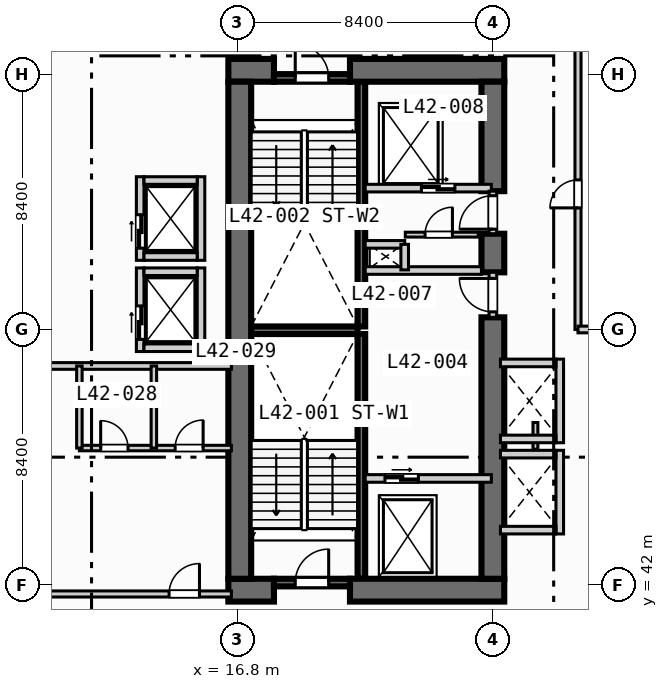
"""IFC4 building model, lengths in metres.
Left out: names, types, materials, properties, quantities, classifications, styles, units other than length and angle.
Written with IfcOpenShell. Run it as: python <this file> out.ifc"""

import sys

from ifc_helpers import new_model, si_unit, direction, frame, frame_2d, origin, place, context, subcontext, project, spatial, rectangle, extrude, element, fill, save


model = new_model("IFC4")
c1 = context("Model", 3, precision=1e-05, world=origin(), true_north=direction((0.0, 1.0)))
c2 = subcontext(c1, "Body", "Model", "MODEL_VIEW")
j1 = project(units=[si_unit("LENGTHUNIT", "METRE"), si_unit("PLANEANGLEUNIT", "RADIAN")], contexts=[c1])
p1 = place(None, origin())
s1 = spatial("IfcSite", under=j1, at=p1, CompositionType="ELEMENT")
p2 = place(p1, origin())
s2 = spatial("IfcBuilding", under=s1, at=p2, CompositionType="ELEMENT")
p3 = place(p2, frame((0.0, 0.0, 175.4)))
s3 = spatial("IfcBuildingStorey", under=s2, at=p3, CompositionType="ELEMENT", Elevation=175.4)
for number, where, z_axis, x_axis in (
    (1, (20.875, 42.2, 0.0), (0.0, 0.0, 1.0), (0.0, 1.0, 0.0)),
    (2, (20.875, 50.5, 0.0), (0.0, 0.0, 1.0), (0.0, 1.0, 0.0)),
):
    element("IfcWall", number, at=place(p3, frame(where, z_axis=z_axis, x_axis=x_axis)), inside=s3, PredefinedType="SOLIDWALL", context=c2, shape_type="SweptSolid", body=[
        extrude(rectangle(XDim=8.05, YDim=0.25, at=frame_2d((4.025, 0.0))), origin(), (0.0, 0.0, 1.0), 3.47),
    ])
p4 = place(p3, frame((17.25, 50.375, 0.0), z_axis=(0.0, 0.0, 1.0), x_axis=(1.0, 0.0, 0.0)))
e3 = element("IfcWall", 3, at=p4, inside=s3, PredefinedType="SOLIDWALL", context=c2, shape_type="SweptSolid", body=[
    extrude(rectangle(XDim=3.5, YDim=0.25, at=frame_2d((1.75, 0.0))), origin(), (0.0, 0.0, 1.0), 3.47),
])
p5 = place(p3, frame((16.5, 41.825, 0.0), z_axis=(0.0, 0.0, 1.0), x_axis=(1.0, 0.0, 0.0)))
e4 = element("IfcWall", 4, at=p5, inside=s3, PredefinedType="SHEAR", context=c2, shape_type="SweptSolid", body=[
    extrude(rectangle(XDim=1.5, YDim=0.75, at=frame_2d((0.75, 0.0))), origin(), (0.0, 0.0, 1.0), 3.47),
])
p6 = place(p3, frame((20.5, 41.825, 0.0), z_axis=(0.0, 0.0, 1.0), x_axis=(1.0, 0.0, 0.0)))
e5 = element("IfcWall", 5, at=p6, inside=s3, PredefinedType="SHEAR", context=c2, shape_type="SweptSolid", body=[
    extrude(rectangle(XDim=5.075, YDim=0.75, at=frame_2d((2.538, 0.0))), origin(), (0.0, 0.0, 1.0), 3.47),
])
p7 = place(p3, frame((16.5, 58.925, 0.0), z_axis=(0.0, 0.0, 1.0), x_axis=(1.0, 0.0, 0.0)))
e6 = element("IfcWall", 6, at=p7, inside=s3, PredefinedType="SHEAR", context=c2, shape_type="SweptSolid", body=[
    extrude(rectangle(XDim=1.5, YDim=0.75, at=frame_2d((0.75, 0.0))), origin(), (0.0, 0.0, 1.0), 3.47),
])
p8 = place(p3, frame((20.5, 58.925, 0.0), z_axis=(0.0, 0.0, 1.0), x_axis=(1.0, 0.0, 0.0)))
e7 = element("IfcWall", 7, at=p8, inside=s3, PredefinedType="SHEAR", context=c2, shape_type="SweptSolid", body=[
    extrude(rectangle(XDim=5.075, YDim=0.75, at=frame_2d((2.538, 0.0))), origin(), (0.0, 0.0, 1.0), 3.47),
])
p9 = place(p3, frame((16.875, 42.2, 0.0), z_axis=(0.0, 0.0, 1.0), x_axis=(0.0, 1.0, 0.0)))
e8 = element("IfcWall", 8, at=p9, inside=s3, PredefinedType="SHEAR", context=c2, shape_type="SweptSolid", body=[
    extrude(rectangle(XDim=16.35, YDim=0.75, at=frame_2d((8.175, 0.0))), origin(), (0.0, 0.0, 1.0), 3.47),
])
p10 = place(p3, frame((25.2, 42.2, 0.0), z_axis=(0.0, 0.0, 1.0), x_axis=(0.0, 1.0, 0.0)))
e9 = element("IfcWall", 9, at=p10, inside=s3, PredefinedType="SHEAR", context=c2, shape_type="SweptSolid", body=[
    extrude(rectangle(XDim=8.6, YDim=0.75, at=frame_2d((4.3, 0.0))), origin(), (0.0, 0.0, 1.0), 3.47),
])
p11 = place(p3, frame((25.2, 52.28, 0.0), z_axis=(0.0, 0.0, 1.0), x_axis=(0.0, 1.0, 0.0)))
e10 = element("IfcWall", 10, at=p11, inside=s3, PredefinedType="SHEAR", context=c2, shape_type="SweptSolid", body=[
    extrude(rectangle(XDim=1.27, YDim=0.75, at=frame_2d((0.635, 0.0))), origin(), (0.0, 0.0, 1.0), 3.47),
])
p12 = place(p3, frame((25.2, 54.95, 0.0), z_axis=(0.0, 0.0, 1.0), x_axis=(0.0, 1.0, 0.0)))
e11 = element("IfcWall", 11, at=p12, inside=s3, PredefinedType="SHEAR", context=c2, shape_type="SweptSolid", body=[
    extrude(rectangle(XDim=3.6, YDim=0.75, at=frame_2d((1.8, 0.0))), origin(), (0.0, 0.0, 1.0), 3.47),
])
p13 = place(p3, frame((18.0, 42.075, 0.0), z_axis=(0.0, 0.0, 1.0), x_axis=(1.0, 0.0, 0.0)))
e12 = element("IfcWall", 12, at=p13, inside=s3, PredefinedType="SOLIDWALL", context=c2, shape_type="SweptSolid", body=[
    extrude(rectangle(XDim=2.5, YDim=0.25, at=frame_2d((1.25, 0.0))), origin(), (0.0, 0.0, 1.0), 3.47),
])
p14 = place(p13, frame((0.7, 0.0, 0.0)))
e13 = element("IfcOpeningElement", 13, at=p14, cuts=e12, PredefinedType="OPENING", context=c2, shape_type="SweptSolid", body=[
    extrude(rectangle(XDim=1.1, YDim=2.15, at=frame_2d((0.55, 1.075))), frame((0.0, 0.135, 0.0), z_axis=(0.0, -1.0, 0.0), x_axis=(1.0, 0.0, 0.0)), (0.0, 0.0, 1.0), 0.27),
])
p15 = place(p3, frame((18.0, 58.675, 0.0), z_axis=(0.0, 0.0, 1.0), x_axis=(1.0, 0.0, 0.0)))
e14 = element("IfcWall", 14, at=p15, inside=s3, PredefinedType="SOLIDWALL", context=c2, shape_type="SweptSolid", body=[
    extrude(rectangle(XDim=2.5, YDim=0.25, at=frame_2d((1.25, 0.0))), origin(), (0.0, 0.0, 1.0), 3.47),
])
p16 = place(p15, frame((0.7, 0.0, 0.0)))
e15 = element("IfcOpeningElement", 15, at=p16, cuts=e14, PredefinedType="OPENING", context=c2, shape_type="SweptSolid", body=[
    extrude(rectangle(XDim=1.1, YDim=2.15, at=frame_2d((0.55, 1.075))), frame((0.0, 0.135, 0.0), z_axis=(0.0, -1.0, 0.0), x_axis=(1.0, 0.0, 0.0)), (0.0, 0.0, 1.0), 0.27),
])
p17 = place(p3, frame((21.0, 45.5, 0.0), z_axis=(0.0, 0.0, 1.0), x_axis=(1.0, 0.0, 0.0)))
e16 = element("IfcWall", 16, at=p17, inside=s3, PredefinedType="SOLIDWALL", context=c2, shape_type="SweptSolid", body=[
    extrude(rectangle(XDim=4.15, YDim=0.25, at=frame_2d((2.075, 0.0))), origin(), (0.0, 0.0, 1.0), 3.47),
])
p18 = place(p17, frame((0.65, 0.0, 0.0)))
e17 = element("IfcOpeningElement", 17, at=p18, cuts=e16, PredefinedType="OPENING", context=c2, shape_type="SweptSolid", body=[
    extrude(rectangle(XDim=1.1, YDim=2.15, at=frame_2d((0.55, 1.075))), frame((0.0, 0.135, 0.0), z_axis=(0.0, -1.0, 0.0), x_axis=(1.0, 0.0, 0.0)), (0.0, 0.0, 1.0), 0.27),
])
p19 = place(p3, frame((25.2, 50.8, 0.0), z_axis=(0.0, 0.0, 1.0), x_axis=(0.0, 1.0, 0.0)))
e18 = element("IfcWall", 18, at=p19, inside=s3, PredefinedType="SOLIDWALL", context=c2, shape_type="SweptSolid", body=[
    extrude(rectangle(XDim=1.48, YDim=0.25, at=frame_2d((0.74, 0.0))), origin(), (0.0, 0.0, 1.0), 3.47),
])
p20 = place(p19, frame((0.18, 0.0, 0.0)))
e19 = element("IfcOpeningElement", 19, at=p20, cuts=e18, PredefinedType="OPENING", context=c2, shape_type="SweptSolid", body=[
    extrude(rectangle(XDim=1.1, YDim=2.15, at=frame_2d((0.55, 1.075))), frame((0.0, 0.135, 0.0), z_axis=(0.0, -1.0, 0.0), x_axis=(1.0, 0.0, 0.0)), (0.0, 0.0, 1.0), 0.27),
])
p21 = place(p3, frame((21.0, 52.34, 0.0), z_axis=(0.0, 0.0, 1.0), x_axis=(1.0, 0.0, 0.0)))
e20 = element("IfcWall", 20, at=p21, inside=s3, PredefinedType="SOLIDWALL", context=c2, shape_type="SweptSolid", body=[
    extrude(rectangle(XDim=3.825, YDim=0.25, at=frame_2d((1.913, 0.0))), origin(), (0.0, 0.0, 1.0), 3.47),
])
p22 = place(p3, frame((21.0, 55.05, 0.0), z_axis=(0.0, 0.0, 1.0), x_axis=(1.0, 0.0, 0.0)))
e21 = element("IfcWall", 21, at=p22, inside=s3, PredefinedType="SOLIDWALL", context=c2, shape_type="SweptSolid", body=[
    extrude(rectangle(XDim=4.15, YDim=0.25, at=frame_2d((2.075, 0.0))), origin(), (0.0, 0.0, 1.0), 3.47),
])
p23 = place(p22, frame((1.85, 0.0, 0.0)))
e22 = element("IfcOpeningElement", 22, at=p23, cuts=e21, PredefinedType="OPENING", context=c2, shape_type="SweptSolid", body=[
    extrude(rectangle(XDim=1.1, YDim=2.15, at=frame_2d((0.55, 1.075))), frame((0.0, 0.135, 0.0), z_axis=(0.0, -1.0, 0.0), x_axis=(1.0, 0.0, 0.0)), (0.0, 0.0, 1.0), 0.27),
])
p24 = place(p3, frame((25.2, 53.55, 0.0), z_axis=(0.0, 0.0, 1.0), x_axis=(0.0, 1.0, 0.0)))
e23 = element("IfcWall", 23, at=p24, inside=s3, PredefinedType="SOLIDWALL", context=c2, shape_type="SweptSolid", body=[
    extrude(rectangle(XDim=1.4, YDim=0.25, at=frame_2d((0.7, 0.0))), origin(), (0.0, 0.0, 1.0), 3.47),
])
p25 = place(p24, frame((0.15, 0.0, 0.0)))
e24 = element("IfcOpeningElement", 24, at=p25, cuts=e23, PredefinedType="OPENING", context=c2, shape_type="SweptSolid", body=[
    extrude(rectangle(XDim=1.1, YDim=2.15, at=frame_2d((0.55, 1.075))), frame((0.0, 0.135, 0.0), z_axis=(0.0, -1.0, 0.0), x_axis=(1.0, 0.0, 0.0)), (0.0, 0.0, 1.0), 0.27),
])
p26 = place(p3, frame((21.0, 53.2, 0.0), z_axis=(0.0, 0.0, 1.0), x_axis=(1.0, 0.0, 0.0)))
e25 = element("IfcWall", 25, at=p26, inside=s3, PredefinedType="SOLIDWALL", context=c2, shape_type="SweptSolid", body=[
    extrude(rectangle(XDim=1.3, YDim=0.25, at=frame_2d((0.65, 0.0))), origin(), (0.0, 0.0, 1.0), 3.47),
])
p27 = place(p3, frame((22.3, 52.36, 0.0), z_axis=(0.0, 0.0, 1.0), x_axis=(0.0, 1.0, 0.0)))
e26 = element("IfcWall", 26, at=p27, inside=s3, PredefinedType="SOLIDWALL", context=c2, shape_type="SweptSolid", body=[
    extrude(rectangle(XDim=0.84, YDim=0.25, at=frame_2d((0.42, 0.0))), origin(), (0.0, 0.0, 1.0), 3.47),
])
p28 = place(p3, frame((22.32, 53.52, 0.0), z_axis=(0.0, 0.0, 1.0), x_axis=(1.0, 0.0, 0.0)))
e27 = element("IfcWall", 27, at=p28, inside=s3, PredefinedType="PARTITIONING", context=c2, shape_type="SweptSolid", body=[
    extrude(rectangle(XDim=2.4, YDim=0.16, at=frame_2d((1.2, 0.0))), origin(), (0.0, 0.0, 1.0), 3.47),
])
p29 = place(p28, frame((0.65, 0.0, 0.0)))
e28 = element("IfcOpeningElement", 28, at=p29, cuts=e27, PredefinedType="OPENING", context=c2, shape_type="SweptSolid", body=[
    extrude(rectangle(XDim=0.9, YDim=2.1, at=frame_2d((0.45, 1.05))), frame((0.0, 0.09, 0.0), z_axis=(0.0, -1.0, 0.0), x_axis=(1.0, 0.0, 0.0)), (0.0, 0.0, 1.0), 0.18),
])
p30 = place(p3, frame((13.6, 49.675, 0.0), z_axis=(0.0, 0.0, 1.0), x_axis=(0.0, 1.0, 0.0)))
e29 = element("IfcWall", 29, at=p30, inside=s3, PredefinedType="SOLIDWALL", context=c2, shape_type="SweptSolid", body=[
    extrude(rectangle(XDim=2.75, YDim=0.25, at=frame_2d((1.375, 0.0))), origin(), (0.0, 0.0, 1.0), 3.47),
])
p31 = place(p30, frame((0.4, 0.0, 0.0)))
e30 = element("IfcOpeningElement", 30, at=p31, cuts=e29, PredefinedType="OPENING", context=c2, shape_type="SweptSolid", body=[
    extrude(rectangle(XDim=1.1, YDim=2.15, at=frame_2d((0.55, 1.075))), frame((0.0, 0.135, 0.0), z_axis=(0.0, -1.0, 0.0), x_axis=(1.0, 0.0, 0.0)), (0.0, 0.0, 1.0), 0.27),
])
p32 = place(p3, frame((15.6, 49.675, 0.0), z_axis=(0.0, 0.0, 1.0), x_axis=(0.0, 1.0, 0.0)))
e31 = element("IfcWall", 31, at=p32, inside=s3, PredefinedType="SOLIDWALL", context=c2, shape_type="SweptSolid", body=[
    extrude(rectangle(XDim=2.75, YDim=0.25, at=frame_2d((1.375, 0.0))), origin(), (0.0, 0.0, 1.0), 3.47),
])
for number, where, z_axis, x_axis in (
    (32, (13.725, 49.8, 0.0), (0.0, 0.0, 1.0), (1.0, 0.0, 0.0)),
    (33, (13.725, 52.3, 0.0), (0.0, 0.0, 1.0), (1.0, 0.0, 0.0)),
):
    element("IfcWall", number, at=place(p3, frame(where, z_axis=z_axis, x_axis=x_axis)), inside=s3, PredefinedType="SOLIDWALL", context=c2, shape_type="SweptSolid", body=[
        extrude(rectangle(XDim=1.75, YDim=0.25, at=frame_2d((0.875, 0.0))), origin(), (0.0, 0.0, 1.0), 3.47),
    ])
p33 = place(p3, frame((13.6, 52.675, 0.0), z_axis=(0.0, 0.0, 1.0), x_axis=(0.0, 1.0, 0.0)))
e34 = element("IfcWall", 34, at=p33, inside=s3, PredefinedType="SOLIDWALL", context=c2, shape_type="SweptSolid", body=[
    extrude(rectangle(XDim=2.75, YDim=0.25, at=frame_2d((1.375, 0.0))), origin(), (0.0, 0.0, 1.0), 3.47),
])
p34 = place(p33, frame((0.4, 0.0, 0.0)))
e35 = element("IfcOpeningElement", 35, at=p34, cuts=e34, PredefinedType="OPENING", context=c2, shape_type="SweptSolid", body=[
    extrude(rectangle(XDim=1.1, YDim=2.15, at=frame_2d((0.55, 1.075))), frame((0.0, 0.135, 0.0), z_axis=(0.0, -1.0, 0.0), x_axis=(1.0, 0.0, 0.0)), (0.0, 0.0, 1.0), 0.27),
])
p35 = place(p3, frame((15.6, 52.675, 0.0), z_axis=(0.0, 0.0, 1.0), x_axis=(0.0, 1.0, 0.0)))
e36 = element("IfcWall", 36, at=p35, inside=s3, PredefinedType="SOLIDWALL", context=c2, shape_type="SweptSolid", body=[
    extrude(rectangle(XDim=2.75, YDim=0.25, at=frame_2d((1.375, 0.0))), origin(), (0.0, 0.0, 1.0), 3.47),
])
for number, where, z_axis, x_axis in (
    (37, (13.725, 52.8, 0.0), (0.0, 0.0, 1.0), (1.0, 0.0, 0.0)),
    (38, (13.725, 55.3, 0.0), (0.0, 0.0, 1.0), (1.0, 0.0, 0.0)),
):
    element("IfcWall", number, at=place(p3, frame(where, z_axis=z_axis, x_axis=x_axis)), inside=s3, PredefinedType="SOLIDWALL", context=c2, shape_type="SweptSolid", body=[
        extrude(rectangle(XDim=1.75, YDim=0.25, at=frame_2d((0.875, 0.0))), origin(), (0.0, 0.0, 1.0), 3.47),
    ])
p36 = place(p3, frame((27.4, 43.675, 0.0), z_axis=(0.0, 0.0, 1.0), x_axis=(0.0, 1.0, 0.0)))
e39 = element("IfcWall", 39, at=p36, inside=s3, PredefinedType="SOLIDWALL", context=c2, shape_type="SweptSolid", body=[
    extrude(rectangle(XDim=2.75, YDim=0.25, at=frame_2d((1.375, 0.0))), origin(), (0.0, 0.0, 1.0), 3.47),
])
for number, where, z_axis, x_axis in (
    (40, (25.45, 43.8, 0.0), (0.0, 0.0, 1.0), (1.0, 0.0, 0.0)),
    (41, (25.45, 46.3, 0.0), (0.0, 0.0, 1.0), (1.0, 0.0, 0.0)),
):
    element("IfcWall", number, at=place(p3, frame(where, z_axis=z_axis, x_axis=x_axis)), inside=s3, PredefinedType="SOLIDWALL", context=c2, shape_type="SweptSolid", body=[
        extrude(rectangle(XDim=1.825, YDim=0.25, at=frame_2d((0.913, 0.0))), origin(), (0.0, 0.0, 1.0), 3.47),
    ])
p37 = place(p3, frame((26.6, 46.46, 0.0), z_axis=(0.0, 0.0, 1.0), x_axis=(0.0, 1.0, 0.0)))
e42 = element("IfcWall", 42, at=p37, inside=s3, PredefinedType="PARTITIONING", context=c2, shape_type="SweptSolid", body=[
    extrude(rectangle(XDim=0.88, YDim=0.16, at=frame_2d((0.44, 0.0))), origin(), (0.0, 0.0, 1.0), 3.47),
])
p38 = place(p3, frame((27.4, 46.675, 0.0), z_axis=(0.0, 0.0, 1.0), x_axis=(0.0, 1.0, 0.0)))
e43 = element("IfcWall", 43, at=p38, inside=s3, PredefinedType="SOLIDWALL", context=c2, shape_type="SweptSolid", body=[
    extrude(rectangle(XDim=2.75, YDim=0.25, at=frame_2d((1.375, 0.0))), origin(), (0.0, 0.0, 1.0), 3.47),
])
for number, where, z_axis, x_axis in (
    (44, (25.45, 46.8, 0.0), (0.0, 0.0, 1.0), (1.0, 0.0, 0.0)),
    (45, (25.45, 49.3, 0.0), (0.0, 0.0, 1.0), (1.0, 0.0, 0.0)),
):
    element("IfcWall", number, at=place(p3, frame(where, z_axis=z_axis, x_axis=x_axis)), inside=s3, PredefinedType="SOLIDWALL", context=c2, shape_type="SweptSolid", body=[
        extrude(rectangle(XDim=1.825, YDim=0.25, at=frame_2d((0.913, 0.0))), origin(), (0.0, 0.0, 1.0), 3.47),
    ])
p39 = place(p3, frame((0.35, 41.7, 0.0), z_axis=(0.0, 0.0, 1.0), x_axis=(1.0, 0.0, 0.0)))
e46 = element("IfcWall", 46, at=p39, inside=s3, PredefinedType="PARTITIONING", context=c2, shape_type="SweptSolid", body=[
    extrude(rectangle(XDim=16.25, YDim=0.2, at=frame_2d((8.125, 0.0))), origin(), (0.0, 0.0, 1.0), 2.82),
])
p40 = place(p39, frame((14.2, 0.0, 0.0)))
e47 = element("IfcOpeningElement", 47, at=p40, cuts=e46, PredefinedType="OPENING", context=c2, shape_type="SweptSolid", body=[
    extrude(rectangle(XDim=1.0, YDim=2.15, at=frame_2d((0.5, 1.075))), frame((0.0, 0.11, 0.0), z_axis=(0.0, -1.0, 0.0), x_axis=(1.0, 0.0, 0.0)), (0.0, 0.0, 1.0), 0.22),
])
p41 = place(p3, frame((0.35, 49.2, 0.0), z_axis=(0.0, 0.0, 1.0), x_axis=(1.0, 0.0, 0.0)))
e48 = element("IfcWall", 48, at=p41, inside=s3, PredefinedType="PARTITIONING", context=c2, shape_type="SweptSolid", body=[
    extrude(rectangle(XDim=16.25, YDim=0.22, at=frame_2d((8.125, 0.0))), origin(), (0.0, 0.0, 1.0), 3.47),
])
p42 = place(p3, frame((11.6, 46.5, 0.0), z_axis=(0.0, 0.0, 1.0), x_axis=(1.0, 0.0, 0.0)))
e49 = element("IfcWall", 49, at=p42, inside=s3, PredefinedType="PLUMBINGWALL", context=c2, shape_type="SweptSolid", body=[
    extrude(rectangle(XDim=5.0, YDim=0.18, at=frame_2d((2.5, 0.0))), origin(), (0.0, 0.0, 1.0), 3.47),
])
p43 = place(p42, frame((0.7, 0.0, 0.0)))
e50 = element("IfcOpeningElement", 50, at=p43, cuts=e49, PredefinedType="OPENING", context=c2, shape_type="SweptSolid", body=[
    extrude(rectangle(XDim=0.9, YDim=2.1, at=frame_2d((0.45, 1.05))), frame((0.0, 0.1, 0.0), z_axis=(0.0, -1.0, 0.0), x_axis=(1.0, 0.0, 0.0)), (0.0, 0.0, 1.0), 0.2),
])
p44 = place(p42, frame((3.15, 0.0, 0.0)))
e51 = element("IfcOpeningElement", 51, at=p44, cuts=e49, PredefinedType="OPENING", context=c2, shape_type="SweptSolid", body=[
    extrude(rectangle(XDim=0.92, YDim=2.1, at=frame_2d((0.46, 1.05))), frame((0.0, 0.1, 0.0), z_axis=(0.0, -1.0, 0.0), x_axis=(1.0, 0.0, 0.0)), (0.0, 0.0, 1.0), 0.2),
])
for number, where, z_axis, x_axis in (
    (52, (11.6, 46.5, 0.0), (0.0, 0.0, 1.0), (0.0, 1.0, 0.0)),
    (53, (14.05, 46.5, 0.0), (0.0, 0.0, 1.0), (0.0, 1.0, 0.0)),
):
    element("IfcWall", number, at=place(p3, frame(where, z_axis=z_axis, x_axis=x_axis)), inside=s3, PredefinedType="PLUMBINGWALL", context=c2, shape_type="SweptSolid", body=[
        extrude(rectangle(XDim=2.7, YDim=0.18, at=frame_2d((1.35, 0.0))), origin(), (0.0, 0.0, 1.0), 3.47),
    ])
p45 = place(p3, frame((28.0, 50.4, 0.0), z_axis=(0.0, 0.0, 1.0), x_axis=(0.0, 1.0, 0.0)))
e54 = element("IfcWall", 54, at=p45, inside=s3, PredefinedType="PARTITIONING", context=c2, shape_type="SweptSolid", body=[
    extrude(rectangle(XDim=21.8, YDim=0.2, at=frame_2d((10.9, 0.0))), origin(), (0.0, 0.0, 1.0), 3.47),
])
p46 = place(p45, frame((4.0, 0.0, 0.0)))
e55 = element("IfcOpeningElement", 55, at=p46, cuts=e54, PredefinedType="OPENING", context=c2, shape_type="SweptSolid", body=[
    extrude(rectangle(XDim=0.92, YDim=2.1, at=frame_2d((0.46, 1.05))), frame((0.0, 0.11, 0.0), z_axis=(0.0, -1.0, 0.0), x_axis=(1.0, 0.0, 0.0)), (0.0, 0.0, 1.0), 0.22),
])
p47 = place(p3, frame((28.0, 50.4, 0.0), z_axis=(0.0, 0.0, 1.0), x_axis=(1.0, 0.0, 0.0)))
e56 = element("IfcWall", 56, at=p47, inside=s3, PredefinedType="PARTITIONING", context=c2, shape_type="SweptSolid", body=[
    extrude(rectangle(XDim=5.3, YDim=0.22, at=frame_2d((2.65, 0.0))), origin(), (0.0, 0.0, 1.0), 3.007),
])
p48 = place(p14, origin())
e57 = element("IfcDoor", 57, at=p48, inside=s3, OperationType="SINGLE_SWING_RIGHT", PredefinedType="DOOR", context=c2, shape_type="SweptSolid", body=[
    extrude(rectangle(XDim=1.1, YDim=2.15, at=frame_2d((0.55, 1.075))), frame((0.0, 0.025, 0.0), z_axis=(0.0, -1.0, 0.0), x_axis=(1.0, 0.0, 0.0)), (0.0, 0.0, 1.0), 0.05),
])
fill(e13, e57)
p49 = place(p16, origin())
e58 = element("IfcDoor", 58, at=p49, inside=s3, OperationType="SINGLE_SWING_LEFT", PredefinedType="DOOR", context=c2, shape_type="SweptSolid", body=[
    extrude(rectangle(XDim=1.1, YDim=2.15, at=frame_2d((0.55, 1.075))), frame((0.0, 0.025, 0.0), z_axis=(0.0, -1.0, 0.0), x_axis=(1.0, 0.0, 0.0)), (0.0, 0.0, 1.0), 0.05),
])
fill(e15, e58)
p50 = place(p18, origin())
e59 = element("IfcDoor", 59, at=p50, inside=s3, OperationType="SLIDING_TO_LEFT", PredefinedType="DOOR", context=c2, shape_type="SweptSolid", body=[
    extrude(rectangle(XDim=1.1, YDim=2.15, at=frame_2d((0.55, 1.075))), frame((0.0, 0.025, 0.0), z_axis=(0.0, -1.0, 0.0), x_axis=(1.0, 0.0, 0.0)), (0.0, 0.0, 1.0), 0.05),
])
fill(e17, e59)
p51 = place(p20, origin())
e60 = element("IfcDoor", 60, at=p51, inside=s3, OperationType="SINGLE_SWING_RIGHT", PredefinedType="DOOR", context=c2, shape_type="SweptSolid", body=[
    extrude(rectangle(XDim=1.1, YDim=2.15, at=frame_2d((0.55, 1.075))), frame((0.0, 0.025, 0.0), z_axis=(0.0, -1.0, 0.0), x_axis=(1.0, 0.0, 0.0)), (0.0, 0.0, 1.0), 0.05),
])
fill(e19, e60)
p52 = place(p23, origin())
e61 = element("IfcDoor", 61, at=p52, inside=s3, OperationType="SLIDING_TO_LEFT", PredefinedType="DOOR", context=c2, shape_type="SweptSolid", body=[
    extrude(rectangle(XDim=1.1, YDim=2.15, at=frame_2d((0.55, 1.075))), frame((0.0, 0.025, 0.0), z_axis=(0.0, -1.0, 0.0), x_axis=(1.0, 0.0, 0.0)), (0.0, 0.0, 1.0), 0.05),
])
fill(e22, e61)
p53 = place(p25, origin())
e62 = element("IfcDoor", 62, at=p53, inside=s3, OperationType="SINGLE_SWING_LEFT", PredefinedType="DOOR", context=c2, shape_type="SweptSolid", body=[
    extrude(rectangle(XDim=1.1, YDim=2.15, at=frame_2d((0.55, 1.075))), frame((0.0, 0.025, 0.0), z_axis=(0.0, -1.0, 0.0), x_axis=(1.0, 0.0, 0.0)), (0.0, 0.0, 1.0), 0.05),
])
fill(e24, e62)
p54 = place(p29, origin())
e63 = element("IfcDoor", 63, at=p54, inside=s3, OperationType="SINGLE_SWING_RIGHT", PredefinedType="DOOR", context=c2, shape_type="SweptSolid", body=[
    extrude(rectangle(XDim=0.9, YDim=2.1, at=frame_2d((0.45, 1.05))), frame((0.0, 0.025, 0.0), z_axis=(0.0, -1.0, 0.0), x_axis=(1.0, 0.0, 0.0)), (0.0, 0.0, 1.0), 0.05),
])
fill(e28, e63)
p55 = place(p31, origin())
e64 = element("IfcDoor", 64, at=p55, inside=s3, OperationType="SLIDING_TO_LEFT", PredefinedType="DOOR", context=c2, shape_type="SweptSolid", body=[
    extrude(rectangle(XDim=1.1, YDim=2.15, at=frame_2d((0.55, 1.075))), frame((0.0, 0.025, 0.0), z_axis=(0.0, -1.0, 0.0), x_axis=(1.0, 0.0, 0.0)), (0.0, 0.0, 1.0), 0.05),
])
fill(e30, e64)
p56 = place(p34, origin())
e65 = element("IfcDoor", 65, at=p56, inside=s3, OperationType="SLIDING_TO_LEFT", PredefinedType="DOOR", context=c2, shape_type="SweptSolid", body=[
    extrude(rectangle(XDim=1.1, YDim=2.15, at=frame_2d((0.55, 1.075))), frame((0.0, 0.025, 0.0), z_axis=(0.0, -1.0, 0.0), x_axis=(1.0, 0.0, 0.0)), (0.0, 0.0, 1.0), 0.05),
])
fill(e35, e65)
p57 = place(p40, origin())
e66 = element("IfcDoor", 66, at=p57, inside=s3, OperationType="SINGLE_SWING_RIGHT", PredefinedType="DOOR", context=c2, shape_type="SweptSolid", body=[
    extrude(rectangle(XDim=1.0, YDim=2.15, at=frame_2d((0.5, 1.075))), frame((0.0, 0.025, 0.0), z_axis=(0.0, -1.0, 0.0), x_axis=(1.0, 0.0, 0.0)), (0.0, 0.0, 1.0), 0.05),
])
fill(e47, e66)
p58 = place(p43, origin())
e67 = element("IfcDoor", 67, at=p58, inside=s3, OperationType="SINGLE_SWING_LEFT", PredefinedType="DOOR", context=c2, shape_type="SweptSolid", body=[
    extrude(rectangle(XDim=0.9, YDim=2.1, at=frame_2d((0.45, 1.05))), frame((0.0, 0.025, 0.0), z_axis=(0.0, -1.0, 0.0), x_axis=(1.0, 0.0, 0.0)), (0.0, 0.0, 1.0), 0.05),
])
fill(e50, e67)
p59 = place(p44, origin())
e68 = element("IfcDoor", 68, at=p59, inside=s3, OperationType="SINGLE_SWING_RIGHT", PredefinedType="DOOR", context=c2, shape_type="SweptSolid", body=[
    extrude(rectangle(XDim=0.92, YDim=2.1, at=frame_2d((0.46, 1.05))), frame((0.0, 0.025, 0.0), z_axis=(0.0, -1.0, 0.0), x_axis=(1.0, 0.0, 0.0)), (0.0, 0.0, 1.0), 0.05),
])
fill(e51, e68)
p60 = place(p46, origin())
e69 = element("IfcDoor", 69, at=p60, inside=s3, OperationType="SINGLE_SWING_LEFT", PredefinedType="DOOR", context=c2, shape_type="SweptSolid", body=[
    extrude(rectangle(XDim=0.92, YDim=2.1, at=frame_2d((0.46, 1.05))), frame((0.0, 0.025, 0.0), z_axis=(0.0, -1.0, 0.0), x_axis=(1.0, 0.0, 0.0)), (0.0, 0.0, 1.0), 0.05),
])
fill(e55, e69)
save(model, sys.argv[1])
